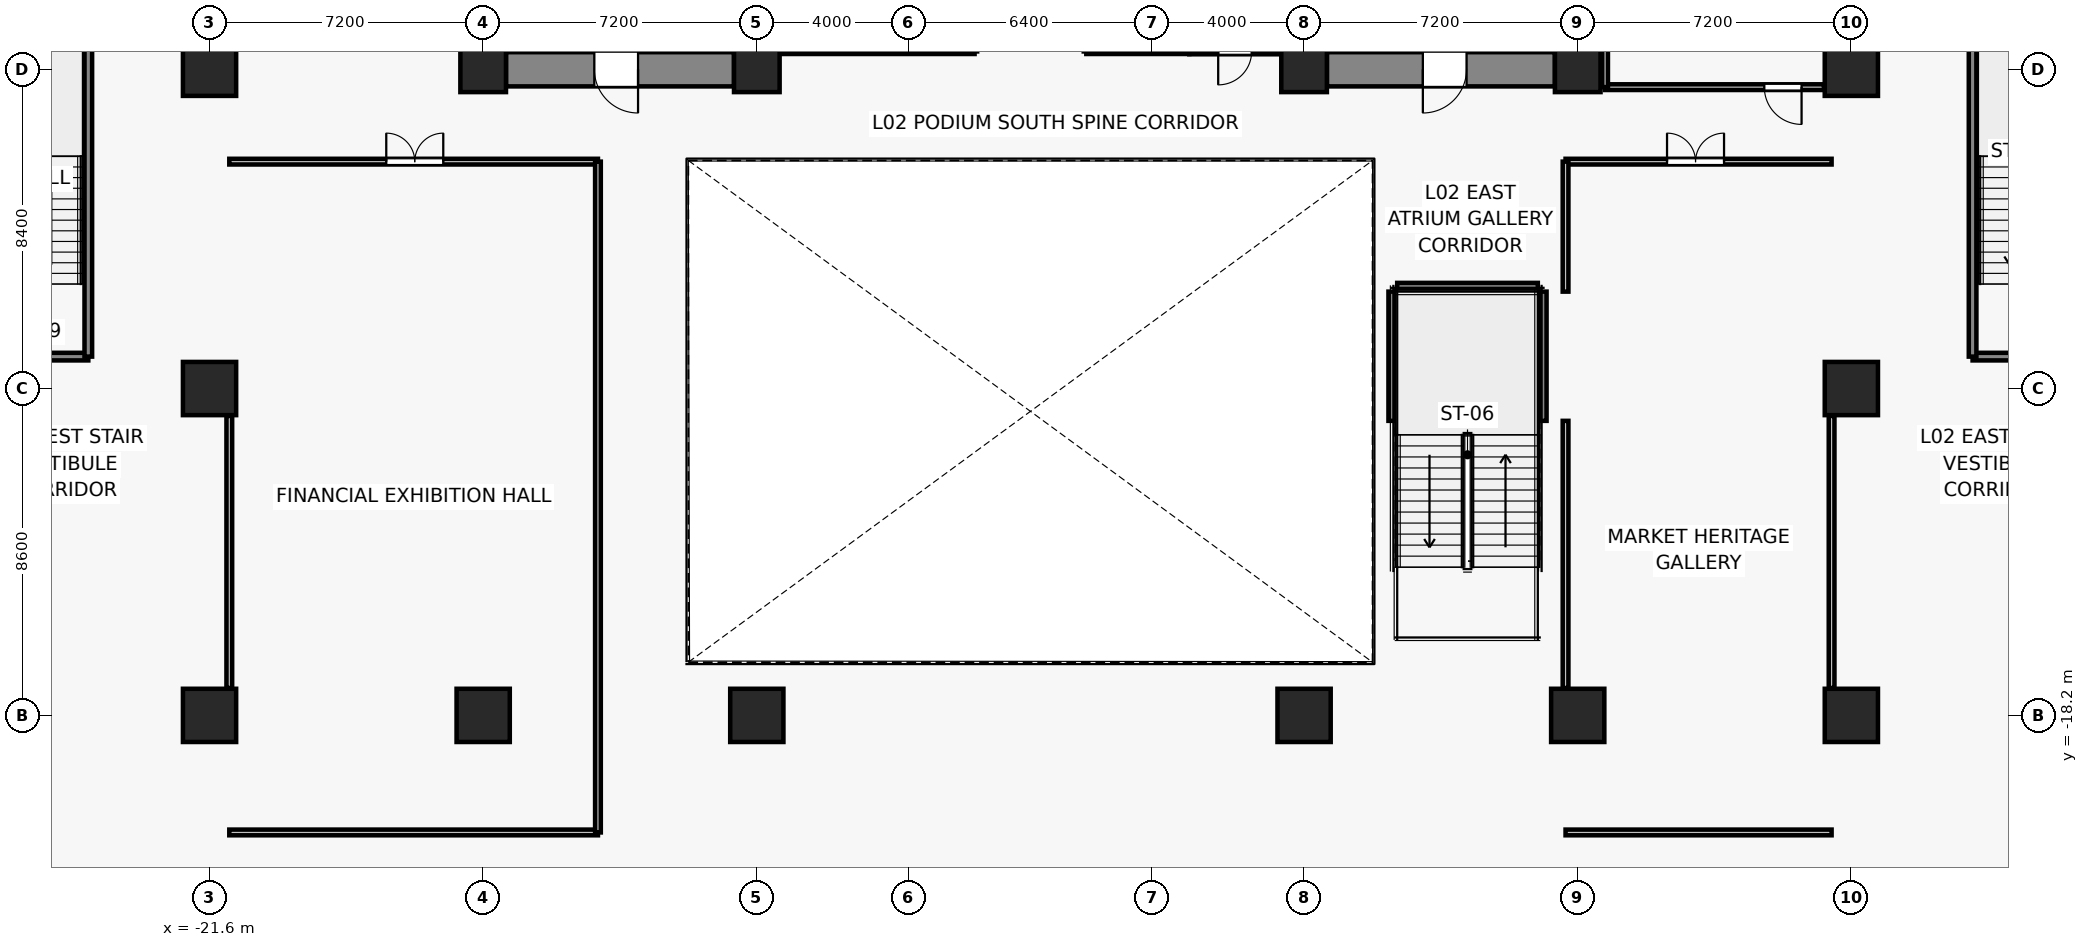
"""IFC4 building model, lengths in metres.
Left out: names, types, materials, properties, quantities, classifications, styles, units other than length and angle.
Written with IfcOpenShell. Run it as: python <this file> out.ifc"""

import sys

from ifc_helpers import new_model, si_unit, direction, frame, frame_2d, origin, origin_2d, place, context, subcontext, project, spatial, rectangle, extrude, source, transform, mapped, element, fill, save


model = new_model("IFC4")
c1 = context("Model", 3, precision=1e-05, world=origin(), true_north=direction((0.0, 1.0)))
c2 = subcontext(c1, "Body", "Model", "MODEL_VIEW")
j1 = project(units=[si_unit("LENGTHUNIT", "METRE"), si_unit("PLANEANGLEUNIT", "RADIAN")], contexts=[c1])
p1 = place(None, origin())
s1 = spatial("IfcSite", under=j1, at=p1, CompositionType="ELEMENT")
p2 = place(p1, origin())
s2 = spatial("IfcBuilding", under=s1, at=p2, CompositionType="ELEMENT")
p3 = place(p2, frame((0.0, 0.0, 9.4)))
s3 = spatial("IfcBuildingStorey", under=s2, at=p3, CompositionType="ELEMENT", Elevation=9.4)
for number, where, z_axis, x_axis in (
    (1, (-14.4, -1.2, 0.0), (0.0, 0.0, 1.0), (1.0, 0.0, 0.0)),
    (2, (-7.2, -1.2, 0.0), (0.0, 0.0, 1.0), (1.0, 0.0, 0.0)),
    (3, (7.2, -1.2, 0.0), (0.0, 0.0, 1.0), (1.0, 0.0, 0.0)),
    (4, (14.4, -1.2, 0.0), (0.0, 0.0, 1.0), (1.0, 0.0, 0.0)),
):
    element("IfcColumn", number, at=place(p3, frame(where, z_axis=z_axis, x_axis=x_axis)), inside=s3, PredefinedType="COLUMN", context=c2, shape_type="SweptSolid", body=[
        extrude(rectangle(XDim=1.2, YDim=1.2, at=origin_2d()), origin(), (0.0, 0.0, 1.0), 4.4),
    ])
for number, where, z_axis, x_axis in (
    (5, (-21.6, -18.2, 0.0), (0.0, 0.0, 1.0), (1.0, 0.0, 0.0)),
    (6, (-14.4, -18.2, 0.0), (0.0, 0.0, 1.0), (1.0, 0.0, 0.0)),
    (7, (-7.2, -18.2, 0.0), (0.0, 0.0, 1.0), (1.0, 0.0, 0.0)),
    (8, (7.2, -18.2, 0.0), (0.0, 0.0, 1.0), (1.0, 0.0, 0.0)),
    (9, (14.4, -18.2, 0.0), (0.0, 0.0, 1.0), (1.0, 0.0, 0.0)),
    (10, (21.6, -18.2, 0.0), (0.0, 0.0, 1.0), (1.0, 0.0, 0.0)),
    (11, (-21.6, -9.6, 0.0), (0.0, 0.0, 1.0), (1.0, 0.0, 0.0)),
    (12, (21.6, -9.6, 0.0), (0.0, 0.0, 1.0), (1.0, 0.0, 0.0)),
    (13, (-21.6, -1.2, 0.0), (0.0, 0.0, 1.0), (1.0, 0.0, 0.0)),
    (14, (21.6, -1.2, 0.0), (0.0, 0.0, 1.0), (1.0, 0.0, 0.0)),
):
    element("IfcColumn", number, at=place(p3, frame(where, z_axis=z_axis, x_axis=x_axis)), inside=s3, PredefinedType="COLUMN", context=c2, shape_type="SweptSolid", body=[
        extrude(rectangle(XDim=1.4, YDim=1.4, at=origin_2d()), origin(), (0.0, 0.0, 1.0), 4.4),
    ])
p4 = place(p3, frame((-7.8, -1.2, 0.0), z_axis=(0.0, 0.0, 1.0), x_axis=(-1.0, 0.0, 0.0)))
e15 = element("IfcWall", 15, at=p4, inside=s3, PredefinedType="SHEAR", context=c2, shape_type="SweptSolid", body=[
    extrude(rectangle(XDim=6.0, YDim=0.9, at=frame_2d((3.0, 0.0))), origin(), (0.0, 0.0, 1.0), 4.1),
])
p5 = place(p4, frame((2.525, 0.0, 0.0)))
e16 = element("IfcOpeningElement", 16, at=p5, cuts=e15, PredefinedType="OPENING", context=c2, shape_type="SweptSolid", body=[
    extrude(rectangle(XDim=1.15, YDim=2.15, at=frame_2d((0.575, 1.075))), frame((0.0, 0.46, 0.0), z_axis=(0.0, -1.0, 0.0), x_axis=(1.0, 0.0, 0.0)), (0.0, 0.0, 1.0), 0.92),
])
p6 = place(p3, frame((13.8, -1.2, 0.0), z_axis=(0.0, 0.0, 1.0), x_axis=(-1.0, 0.0, 0.0)))
e17 = element("IfcWall", 17, at=p6, inside=s3, PredefinedType="SHEAR", context=c2, shape_type="SweptSolid", body=[
    extrude(rectangle(XDim=6.0, YDim=0.9, at=frame_2d((3.0, 0.0))), origin(), (0.0, 0.0, 1.0), 4.1),
])
p7 = place(p6, frame((2.325, 0.0, 0.0)))
e18 = element("IfcOpeningElement", 18, at=p7, cuts=e17, PredefinedType="OPENING", context=c2, shape_type="SweptSolid", body=[
    extrude(rectangle(XDim=1.15, YDim=2.15, at=frame_2d((0.575, 1.075))), frame((0.0, 0.46, 0.0), z_axis=(0.0, -1.0, 0.0), x_axis=(1.0, 0.0, 0.0)), (0.0, 0.0, 1.0), 0.92),
])
for number, where, z_axis, x_axis in (
    (19, (9.52, -10.45, 0.0), (0.0, 0.0, 1.0), (0.0, 1.0, 0.0)),
    (20, (13.48, -7.05, 0.0), (0.0, 0.0, 1.0), (0.0, -1.0, 0.0)),
):
    element("IfcWall", number, at=place(p3, frame(where, z_axis=z_axis, x_axis=x_axis)), inside=s3, PredefinedType="SOLIDWALL", context=c2, shape_type="SweptSolid", body=[
        extrude(rectangle(XDim=3.4, YDim=0.2, at=frame_2d((1.7, 0.0))), origin(), (0.0, 0.0, 1.0), 4.1),
    ])
p8 = place(p3, frame((9.65, -6.92, 0.0), z_axis=(0.0, 0.0, 1.0), x_axis=(1.0, 0.0, 0.0)))
e21 = element("IfcWall", 21, at=p8, inside=s3, PredefinedType="SOLIDWALL", context=c2, shape_type="SweptSolid", body=[
    extrude(rectangle(XDim=3.7, YDim=0.2, at=frame_2d((1.85, 0.0))), origin(), (0.0, 0.0, 1.0), 4.1),
])
p9 = place(p3, frame((-1.47, -0.73, 0.0), z_axis=(0.0, 0.0, 1.0), x_axis=(-1.0, 0.0, 0.0)))
e22 = element("IfcWall", 22, at=p9, inside=s3, PredefinedType="PARTITIONING", context=c2, shape_type="SweptSolid", body=[
    extrude(rectangle(XDim=5.11, YDim=0.135, at=frame_2d((2.555, 0.0))), origin(), (0.0, 0.0, 1.0), 4.1),
])
p10 = place(p3, frame((4.18, -0.73, 0.0), z_axis=(0.0, 0.0, 1.0), x_axis=(-1.0, 0.0, 0.0)))
e23 = element("IfcWall", 23, at=p10, inside=s3, PredefinedType="PARTITIONING", context=c2, shape_type="SweptSolid", body=[
    extrude(rectangle(XDim=2.71, YDim=0.135, at=frame_2d((1.355, 0.0))), origin(), (0.0, 0.0, 1.0), 4.1),
])
p11 = place(p3, frame((6.58, -0.73, 0.0), z_axis=(0.0, 0.0, 1.0), x_axis=(-1.0, 0.0, 0.0)))
e24 = element("IfcWall", 24, at=p11, inside=s3, PredefinedType="PARTITIONING", context=c2, shape_type="SweptSolid", body=[
    extrude(rectangle(XDim=2.4, YDim=0.15, at=frame_2d((1.2, 0.0))), origin(), (0.0, 0.0, 1.0), 4.1),
])
p12 = place(p11, frame((0.76, 0.0, 0.0)))
e25 = element("IfcOpeningElement", 25, at=p12, cuts=e24, PredefinedType="OPENING", context=c2, shape_type="SweptSolid", body=[
    extrude(rectangle(XDim=0.88, YDim=2.1, at=frame_2d((0.44, 1.05))), frame((0.0, 0.085, 0.0), z_axis=(0.0, -1.0, 0.0), x_axis=(1.0, 0.0, 0.0)), (0.0, 0.0, 1.0), 0.17),
])
p13 = place(p3, frame((-24.79, -8.76, 0.0), z_axis=(0.0, 0.0, 1.0), x_axis=(-1.0, 0.0, 0.0)))
e26 = element("IfcWall", 26, at=p13, inside=s3, PredefinedType="SOLIDWALL", context=c2, shape_type="SweptSolid", body=[
    extrude(rectangle(XDim=3.77, YDim=0.2, at=frame_2d((1.885, 0.0))), origin(), (0.0, 0.0, 1.0), 4.1),
])
p14 = place(p13, frame((1.285, 0.0, 0.0)))
e27 = element("IfcOpeningElement", 27, at=p14, cuts=e26, PredefinedType="OPENING", context=c2, shape_type="SweptSolid", body=[
    extrude(rectangle(XDim=1.15, YDim=2.15, at=frame_2d((0.575, 1.075))), frame((0.0, 0.11, 0.0), z_axis=(0.0, -1.0, 0.0), x_axis=(1.0, 0.0, 0.0)), (0.0, 0.0, 1.0), 0.22),
])
p15 = place(p3, frame((-24.79, 0.16, 0.0), z_axis=(0.0, 0.0, 1.0), x_axis=(0.0, -1.0, 0.0)))
e28 = element("IfcWall", 28, at=p15, inside=s3, PredefinedType="SOLIDWALL", context=c2, shape_type="SweptSolid", body=[
    extrude(rectangle(XDim=8.92, YDim=0.2, at=frame_2d((4.46, 0.0))), origin(), (0.0, 0.0, 1.0), 4.1),
])
p16 = place(p3, frame((28.56, -8.76, 0.0), z_axis=(0.0, 0.0, 1.0), x_axis=(-1.0, 0.0, 0.0)))
e29 = element("IfcWall", 29, at=p16, inside=s3, PredefinedType="SOLIDWALL", context=c2, shape_type="SweptSolid", body=[
    extrude(rectangle(XDim=3.77, YDim=0.2, at=frame_2d((1.885, 0.0))), origin(), (0.0, 0.0, 1.0), 4.1),
])
p17 = place(p16, frame((1.335, 0.0, 0.0)))
e30 = element("IfcOpeningElement", 30, at=p17, cuts=e29, PredefinedType="OPENING", context=c2, shape_type="SweptSolid", body=[
    extrude(rectangle(XDim=1.15, YDim=2.15, at=frame_2d((0.575, 1.075))), frame((0.0, 0.11, 0.0), z_axis=(0.0, -1.0, 0.0), x_axis=(1.0, 0.0, 0.0)), (0.0, 0.0, 1.0), 0.22),
])
p18 = place(p3, frame((24.79, -8.76, 0.0), z_axis=(0.0, 0.0, 1.0), x_axis=(0.0, 1.0, 0.0)))
e31 = element("IfcWall", 31, at=p18, inside=s3, PredefinedType="SOLIDWALL", context=c2, shape_type="SweptSolid", body=[
    extrude(rectangle(XDim=8.92, YDim=0.2, at=frame_2d((4.46, 0.0))), origin(), (0.0, 0.0, 1.0), 4.1),
])
p19 = place(p3, frame((-11.38, -21.28, 0.0), z_axis=(0.0, 0.0, 1.0), x_axis=(-1.0, 0.0, 0.0)))
e32 = element("IfcWall", 32, at=p19, inside=s3, PredefinedType="PARTITIONING", context=c2, shape_type="SweptSolid", body=[
    extrude(rectangle(XDim=9.7, YDim=0.15, at=frame_2d((4.85, 0.0))), origin(), (0.0, 0.0, 1.0), 3.19),
])
p20 = place(p3, frame((-21.08, -3.63, 0.0), z_axis=(0.0, 0.0, 1.0), x_axis=(1.0, 0.0, 0.0)))
e33 = element("IfcWall", 33, at=p20, inside=s3, PredefinedType="PARTITIONING", context=c2, shape_type="SweptSolid", body=[
    extrude(rectangle(XDim=9.7, YDim=0.15, at=frame_2d((4.85, 0.0))), origin(), (0.0, 0.0, 1.0), 3.239),
])
p21 = place(p20, frame((4.13, 0.0, 0.0)))
e34 = element("IfcOpeningElement", 34, at=p21, cuts=e33, PredefinedType="OPENING", context=c2, shape_type="SweptSolid", body=[
    extrude(rectangle(XDim=1.5, YDim=2.2, at=frame_2d((0.75, 1.1))), frame((0.0, 0.085, 0.0), z_axis=(0.0, -1.0, 0.0), x_axis=(1.0, 0.0, 0.0)), (0.0, 0.0, 1.0), 0.17),
])
p22 = place(p3, frame((-21.08, -17.48, 0.0), z_axis=(0.0, 0.0, 1.0), x_axis=(0.0, 1.0, 0.0)))
e35 = element("IfcWall", 35, at=p22, inside=s3, PredefinedType="PARTITIONING", context=c2, shape_type="SweptSolid", body=[
    extrude(rectangle(XDim=7.16, YDim=0.15, at=frame_2d((3.58, 0.0))), origin(), (0.0, 0.0, 1.0), 3.29),
])
p23 = place(p3, frame((-11.38, -3.63, 0.0), z_axis=(0.0, 0.0, 1.0), x_axis=(0.0, -1.0, 0.0)))
e36 = element("IfcWall", 36, at=p23, inside=s3, PredefinedType="PARTITIONING", context=c2, shape_type="SweptSolid", body=[
    extrude(rectangle(XDim=17.65, YDim=0.15, at=frame_2d((8.825, 0.0))), origin(), (0.0, 0.0, 1.0), 3.19),
])
p24 = place(p3, frame((21.08, -21.28, 0.0), z_axis=(0.0, 0.0, 1.0), x_axis=(-1.0, 0.0, 0.0)))
e37 = element("IfcWall", 37, at=p24, inside=s3, PredefinedType="PARTITIONING", context=c2, shape_type="SweptSolid", body=[
    extrude(rectangle(XDim=7.0, YDim=0.15, at=frame_2d((3.5, 0.0))), origin(), (0.0, 0.0, 1.0), 3.19),
])
p25 = place(p3, frame((14.08, -3.63, 0.0), z_axis=(0.0, 0.0, 1.0), x_axis=(1.0, 0.0, 0.0)))
e38 = element("IfcWall", 38, at=p25, inside=s3, PredefinedType="PARTITIONING", context=c2, shape_type="SweptSolid", body=[
    extrude(rectangle(XDim=7.0, YDim=0.15, at=frame_2d((3.5, 0.0))), origin(), (0.0, 0.0, 1.0), 3.239),
])
p26 = place(p25, frame((2.67, 0.0, 0.0)))
e39 = element("IfcOpeningElement", 39, at=p26, cuts=e38, PredefinedType="OPENING", context=c2, shape_type="SweptSolid", body=[
    extrude(rectangle(XDim=1.5, YDim=2.2, at=frame_2d((0.75, 1.1))), frame((0.0, 0.085, 0.0), z_axis=(0.0, -1.0, 0.0), x_axis=(1.0, 0.0, 0.0)), (0.0, 0.0, 1.0), 0.17),
])
p27 = place(p3, frame((14.08, -17.48, 0.0), z_axis=(0.0, 0.0, 1.0), x_axis=(0.0, 1.0, 0.0)))
e40 = element("IfcWall", 40, at=p27, inside=s3, PredefinedType="PARTITIONING", context=c2, shape_type="SweptSolid", body=[
    extrude(rectangle(XDim=7.03, YDim=0.15, at=frame_2d((3.515, 0.0))), origin(), (0.0, 0.0, 1.0), 3.29),
])
p28 = place(p3, frame((14.08, -7.05, 0.0), z_axis=(0.0, 0.0, 1.0), x_axis=(0.0, 1.0, 0.0)))
e41 = element("IfcWall", 41, at=p28, inside=s3, PredefinedType="PARTITIONING", context=c2, shape_type="SweptSolid", body=[
    extrude(rectangle(XDim=3.42, YDim=0.15, at=frame_2d((1.71, 0.0))), origin(), (0.0, 0.0, 1.0), 3.29),
])
p29 = place(p3, frame((21.08, -10.32, 0.0), z_axis=(0.0, 0.0, 1.0), x_axis=(0.0, -1.0, 0.0)))
e42 = element("IfcWall", 42, at=p29, inside=s3, PredefinedType="PARTITIONING", context=c2, shape_type="SweptSolid", body=[
    extrude(rectangle(XDim=7.16, YDim=0.15, at=frame_2d((3.58, 0.0))), origin(), (0.0, 0.0, 1.0), 3.29),
])
p30 = place(p3, frame((20.88, -1.67, 0.0), z_axis=(0.0, 0.0, 1.0), x_axis=(-1.0, 0.0, 0.0)))
e43 = element("IfcWall", 43, at=p30, inside=s3, PredefinedType="PARTITIONING", context=c2, shape_type="SweptSolid", body=[
    extrude(rectangle(XDim=5.76, YDim=0.15, at=frame_2d((2.88, 0.0))), origin(), (0.0, 0.0, 1.0), 4.1),
])
p31 = place(p30, frame((0.59, 0.0, 0.0)))
e44 = element("IfcOpeningElement", 44, at=p31, cuts=e43, PredefinedType="OPENING", context=c2, shape_type="SweptSolid", body=[
    extrude(rectangle(XDim=0.98, YDim=2.15, at=frame_2d((0.49, 1.075))), frame((0.0, 0.085, 0.0), z_axis=(0.0, -1.0, 0.0), x_axis=(1.0, 0.0, 0.0)), (0.0, 0.0, 1.0), 0.17),
])
p32 = place(p3, frame((15.12, -1.67, 0.0), z_axis=(0.0, 0.0, 1.0), x_axis=(0.0, 1.0, 0.0)))
e45 = element("IfcWall", 45, at=p32, inside=s3, PredefinedType="PARTITIONING", context=c2, shape_type="SweptSolid", body=[
    extrude(rectangle(XDim=15.15, YDim=0.15, at=frame_2d((7.575, 0.0))), origin(), (0.0, 0.0, 1.0), 3.19),
])
m1 = source(origin(), c2, "Body", "SweptSolid", [
    extrude(rectangle(XDim=1.15, YDim=2.15, at=frame_2d((0.575, 1.075))), frame((0.0, 0.025, 0.0), z_axis=(0.0, -1.0, 0.0), x_axis=(1.0, 0.0, 0.0)), (0.0, 0.0, 1.0), 0.05),
])
p33 = place(p5, origin())
e46 = element("IfcDoor", 46, at=p33, inside=s3, OperationType="SINGLE_SWING_LEFT", PredefinedType="DOOR", context=c2, shape_type="MappedRepresentation", body=[
    mapped(m1, transform((0.0, 0.0, 0.0), x_axis=(1.0, 0.0, 0.0), y_axis=(0.0, 1.0, 0.0), z_axis=(0.0, 0.0, 1.0), scale=1.0)),
])
fill(e16, e46)
p34 = place(p7, origin())
e47 = element("IfcDoor", 47, at=p34, inside=s3, OperationType="SINGLE_SWING_RIGHT", PredefinedType="DOOR", context=c2, shape_type="MappedRepresentation", body=[
    mapped(m1, transform((0.0, 0.0, 0.0), x_axis=(1.0, 0.0, 0.0), y_axis=(0.0, 1.0, 0.0), z_axis=(0.0, 0.0, 1.0), scale=1.0)),
])
fill(e18, e47)
m2 = source(origin(), c2, "Body", "SweptSolid", [
    extrude(rectangle(XDim=0.88, YDim=2.1, at=frame_2d((0.44, 1.05))), frame((0.0, 0.025, 0.0), z_axis=(0.0, -1.0, 0.0), x_axis=(1.0, 0.0, 0.0)), (0.0, 0.0, 1.0), 0.05),
])
p35 = place(p12, origin())
e48 = element("IfcDoor", 48, at=p35, inside=s3, OperationType="SINGLE_SWING_RIGHT", PredefinedType="DOOR", context=c2, shape_type="MappedRepresentation", body=[
    mapped(m2, transform((0.0, 0.0, 0.0), x_axis=(1.0, 0.0, 0.0), y_axis=(0.0, 1.0, 0.0), z_axis=(0.0, 0.0, 1.0), scale=1.0)),
])
fill(e25, e48)
m3 = source(origin(), c2, "Body", "SweptSolid", [
    extrude(rectangle(XDim=1.5, YDim=2.2, at=frame_2d((0.75, 1.1))), frame((0.0, 0.025, 0.0), z_axis=(0.0, -1.0, 0.0), x_axis=(1.0, 0.0, 0.0)), (0.0, 0.0, 1.0), 0.05),
])
p36 = place(p21, origin())
e49 = element("IfcDoor", 49, at=p36, inside=s3, OperationType="DOUBLE_DOOR_SINGLE_SWING", PredefinedType="DOOR", context=c2, shape_type="MappedRepresentation", body=[
    mapped(m3, transform((0.0, 0.0, 0.0), x_axis=(1.0, 0.0, 0.0), y_axis=(0.0, 1.0, 0.0), z_axis=(0.0, 0.0, 1.0), scale=1.0)),
])
fill(e34, e49)
p37 = place(p26, origin())
e50 = element("IfcDoor", 50, at=p37, inside=s3, OperationType="DOUBLE_DOOR_SINGLE_SWING", PredefinedType="DOOR", context=c2, shape_type="MappedRepresentation", body=[
    mapped(m3, transform((0.0, 0.0, 0.0), x_axis=(1.0, 0.0, 0.0), y_axis=(0.0, 1.0, 0.0), z_axis=(0.0, 0.0, 1.0), scale=1.0)),
])
fill(e39, e50)
m4 = source(origin(), c2, "Body", "SweptSolid", [
    extrude(rectangle(XDim=0.98, YDim=2.15, at=frame_2d((0.49, 1.075))), frame((0.0, 0.025, 0.0), z_axis=(0.0, -1.0, 0.0), x_axis=(1.0, 0.0, 0.0)), (0.0, 0.0, 1.0), 0.05),
])
p38 = place(p31, origin())
e51 = element("IfcDoor", 51, at=p38, inside=s3, OperationType="SINGLE_SWING_LEFT", PredefinedType="DOOR", context=c2, shape_type="MappedRepresentation", body=[
    mapped(m4, transform((0.0, 0.0, 0.0), x_axis=(1.0, 0.0, 0.0), y_axis=(0.0, 1.0, 0.0), z_axis=(0.0, 0.0, 1.0), scale=1.0)),
])
fill(e44, e51)
save(model, sys.argv[1])
